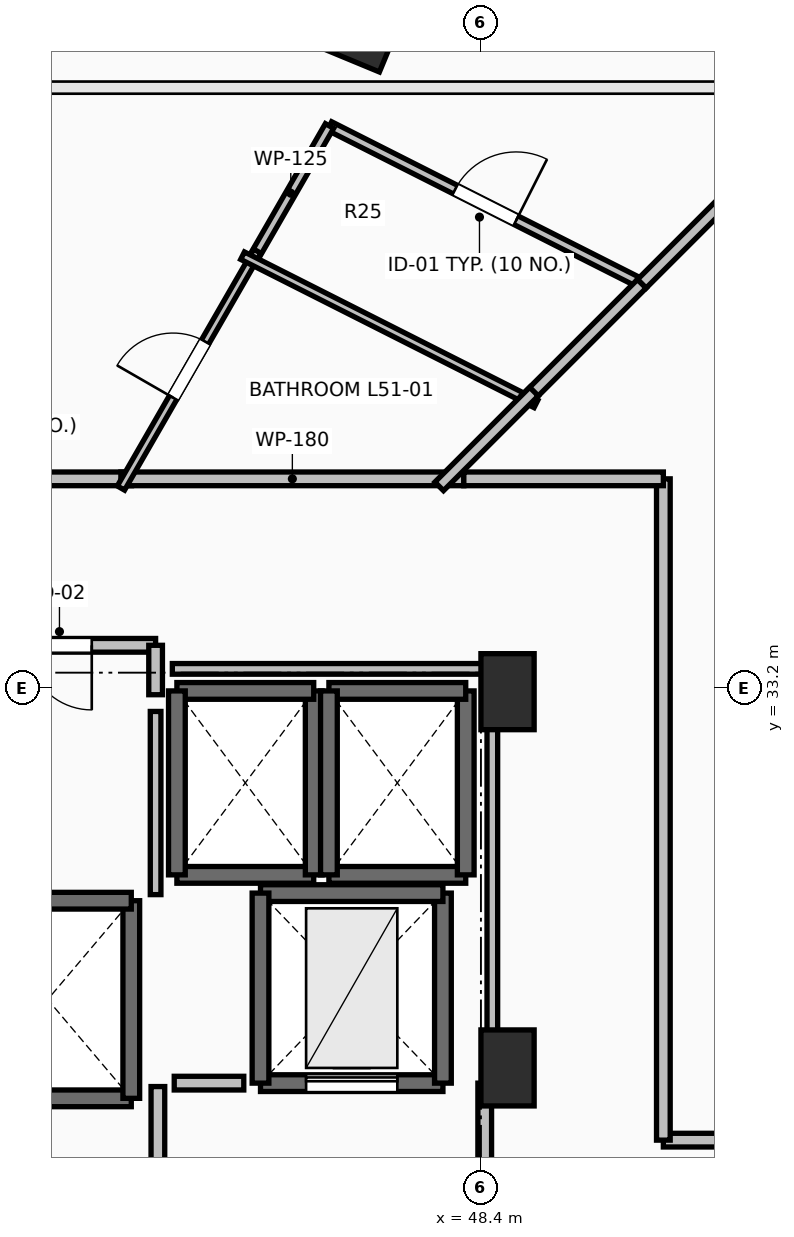
"""IFC4 building model, lengths in metres.
Left out: names, types, materials, properties, quantities, classifications, styles, units other than length and angle.
Written with IfcOpenShell. Run it as: python <this file> out.ifc"""

import sys

from ifc_helpers import new_model, si_unit, direction, frame, frame_2d, origin, origin_2d, place, context, subcontext, project, spatial, rectangle, extrude, element, fill, save


model = new_model("IFC4")
c1 = context("Model", 3, precision=1e-05, world=origin(), true_north=direction((0.0, 1.0)))
c2 = subcontext(c1, "Body", "Model", "MODEL_VIEW")
j1 = project(units=[si_unit("LENGTHUNIT", "METRE"), si_unit("PLANEANGLEUNIT", "RADIAN")], contexts=[c1])
p1 = place(None, origin())
s1 = spatial("IfcSite", under=j1, at=p1, CompositionType="ELEMENT")
p2 = place(p1, origin())
s2 = spatial("IfcBuilding", under=s1, at=p2, CompositionType="ELEMENT")
p3 = place(p2, frame((0.0, 0.0, 189.6)))
s3 = spatial("IfcBuildingStorey", under=s2, at=p3, CompositionType="ELEMENT", Elevation=189.6)
p4 = place(p3, frame((46.821, 41.891, 0.0), z_axis=(0.0, 0.0, 1.0), x_axis=(0.382683432365, 0.923879532511, 0.0)))
e1 = element("IfcColumn", 1, at=p4, inside=s3, PredefinedType="COLUMN", context=c2, shape_type="SweptSolid", body=[
    extrude(rectangle(XDim=0.9, YDim=0.9, at=origin_2d()), origin(), (0.0, 0.0, 1.0), 3.5),
])
for number, where, z_axis, x_axis in (
    (2, (48.75, 33.15, 0.0), (0.0, 0.0, 1.0), (1.0, 0.0, 0.0)),
    (3, (48.75, 28.2, 0.0), (0.0, 0.0, 1.0), (1.0, 0.0, 0.0)),
):
    element("IfcColumn", number, at=place(p3, frame(where, z_axis=z_axis, x_axis=x_axis)), inside=s3, PredefinedType="PILASTER", context=c2, shape_type="SweptSolid", body=[
        extrude(rectangle(XDim=0.7, YDim=1.0, at=origin_2d()), origin(), (0.0, 0.0, 1.0), 3.5),
    ])
p5 = place(p3, frame((41.6, 27.8, 0.0), z_axis=(0.0, 0.0, 1.0), x_axis=(1.0, 0.0, 0.0)))
e4 = element("IfcWall", 4, at=p5, inside=s3, PredefinedType="SOLIDWALL", context=c2, shape_type="SweptSolid", body=[
    extrude(rectangle(XDim=2.2, YDim=0.22, at=frame_2d((1.1, 0.0))), origin(), (0.0, 0.0, 1.0), 3.24),
])
p6 = place(p3, frame((43.8, 27.8, 0.0), z_axis=(0.0, 0.0, 1.0), x_axis=(0.0, 1.0, 0.0)))
e5 = element("IfcWall", 5, at=p6, inside=s3, PredefinedType="SOLIDWALL", context=c2, shape_type="SweptSolid", body=[
    extrude(rectangle(XDim=2.6, YDim=0.22, at=frame_2d((1.3, 0.0))), origin(), (0.0, 0.0, 1.0), 3.24),
])
p7 = place(p3, frame((43.8, 30.4, 0.0), z_axis=(0.0, 0.0, 1.0), x_axis=(-1.0, 0.0, 0.0)))
e6 = element("IfcWall", 6, at=p7, inside=s3, PredefinedType="SOLIDWALL", context=c2, shape_type="SweptSolid", body=[
    extrude(rectangle(XDim=2.2, YDim=0.22, at=frame_2d((1.1, 0.0))), origin(), (0.0, 0.0, 1.0), 3.24),
])
p8 = place(p3, frame((44.4, 30.74, 0.0), z_axis=(0.0, 0.0, 1.0), x_axis=(1.0, 0.0, 0.0)))
e7 = element("IfcWall", 7, at=p8, inside=s3, PredefinedType="SOLIDWALL", context=c2, shape_type="SweptSolid", body=[
    extrude(rectangle(XDim=1.8, YDim=0.22, at=frame_2d((0.9, 0.0))), origin(), (0.0, 0.0, 1.0), 3.24),
])
p9 = place(p3, frame((46.2, 30.74, 0.0), z_axis=(0.0, 0.0, 1.0), x_axis=(0.0, 1.0, 0.0)))
e8 = element("IfcWall", 8, at=p9, inside=s3, PredefinedType="SOLIDWALL", context=c2, shape_type="SweptSolid", body=[
    extrude(rectangle(XDim=2.42, YDim=0.22, at=frame_2d((1.21, 0.0))), origin(), (0.0, 0.0, 1.0), 3.24),
])
p10 = place(p3, frame((46.2, 33.16, 0.0), z_axis=(0.0, 0.0, 1.0), x_axis=(-1.0, 0.0, 0.0)))
e9 = element("IfcWall", 9, at=p10, inside=s3, PredefinedType="SOLIDWALL", context=c2, shape_type="SweptSolid", body=[
    extrude(rectangle(XDim=1.8, YDim=0.22, at=frame_2d((0.9, 0.0))), origin(), (0.0, 0.0, 1.0), 3.24),
])
p11 = place(p3, frame((44.4, 33.16, 0.0), z_axis=(0.0, 0.0, 1.0), x_axis=(0.0, -1.0, 0.0)))
e10 = element("IfcWall", 10, at=p11, inside=s3, PredefinedType="SOLIDWALL", context=c2, shape_type="SweptSolid", body=[
    extrude(rectangle(XDim=2.42, YDim=0.22, at=frame_2d((1.21, 0.0))), origin(), (0.0, 0.0, 1.0), 3.24),
])
p12 = place(p3, frame((46.4, 30.74, 0.0), z_axis=(0.0, 0.0, 1.0), x_axis=(1.0, 0.0, 0.0)))
e11 = element("IfcWall", 11, at=p12, inside=s3, PredefinedType="SOLIDWALL", context=c2, shape_type="SweptSolid", body=[
    extrude(rectangle(XDim=1.8, YDim=0.22, at=frame_2d((0.9, 0.0))), origin(), (0.0, 0.0, 1.0), 3.24),
])
p13 = place(p3, frame((48.2, 30.74, 0.0), z_axis=(0.0, 0.0, 1.0), x_axis=(0.0, 1.0, 0.0)))
e12 = element("IfcWall", 12, at=p13, inside=s3, PredefinedType="SOLIDWALL", context=c2, shape_type="SweptSolid", body=[
    extrude(rectangle(XDim=2.42, YDim=0.22, at=frame_2d((1.21, 0.0))), origin(), (0.0, 0.0, 1.0), 3.24),
])
p14 = place(p3, frame((48.2, 33.16, 0.0), z_axis=(0.0, 0.0, 1.0), x_axis=(-1.0, 0.0, 0.0)))
e13 = element("IfcWall", 13, at=p14, inside=s3, PredefinedType="SOLIDWALL", context=c2, shape_type="SweptSolid", body=[
    extrude(rectangle(XDim=1.8, YDim=0.22, at=frame_2d((0.9, 0.0))), origin(), (0.0, 0.0, 1.0), 3.24),
])
p15 = place(p3, frame((46.4, 33.16, 0.0), z_axis=(0.0, 0.0, 1.0), x_axis=(0.0, -1.0, 0.0)))
e14 = element("IfcWall", 14, at=p15, inside=s3, PredefinedType="SOLIDWALL", context=c2, shape_type="SweptSolid", body=[
    extrude(rectangle(XDim=2.42, YDim=0.22, at=frame_2d((1.21, 0.0))), origin(), (0.0, 0.0, 1.0), 3.24),
])
p16 = place(p3, frame((45.5, 28.0, 0.0), z_axis=(0.0, 0.0, 1.0), x_axis=(1.0, 0.0, 0.0)))
e15 = element("IfcWall", 15, at=p16, inside=s3, PredefinedType="SHEAR", context=c2, shape_type="SweptSolid", body=[
    extrude(rectangle(XDim=2.4, YDim=0.22, at=frame_2d((1.2, 0.0))), origin(), (0.0, 0.0, 1.0), 3.24),
])
p17 = place(p16, frame((0.6, 0.0, 0.0)))
e16 = element("IfcOpeningElement", 16, at=p17, cuts=e15, PredefinedType="OPENING", context=c2, shape_type="SweptSolid", body=[
    extrude(rectangle(XDim=1.2, YDim=2.2, at=frame_2d((0.6, 1.1))), frame((0.0, 0.125, 0.0), z_axis=(0.0, -1.0, 0.0), x_axis=(1.0, 0.0, 0.0)), (0.0, 0.0, 1.0), 0.25),
])
p18 = place(p3, frame((47.9, 28.0, 0.0), z_axis=(0.0, 0.0, 1.0), x_axis=(0.0, 1.0, 0.0)))
e17 = element("IfcWall", 17, at=p18, inside=s3, PredefinedType="SHEAR", context=c2, shape_type="SweptSolid", body=[
    extrude(rectangle(XDim=2.5, YDim=0.22, at=frame_2d((1.25, 0.0))), origin(), (0.0, 0.0, 1.0), 3.24),
])
p19 = place(p3, frame((47.9, 30.5, 0.0), z_axis=(0.0, 0.0, 1.0), x_axis=(-1.0, 0.0, 0.0)))
e18 = element("IfcWall", 18, at=p19, inside=s3, PredefinedType="SHEAR", context=c2, shape_type="SweptSolid", body=[
    extrude(rectangle(XDim=2.4, YDim=0.22, at=frame_2d((1.2, 0.0))), origin(), (0.0, 0.0, 1.0), 3.24),
])
p20 = place(p3, frame((45.5, 30.5, 0.0), z_axis=(0.0, 0.0, 1.0), x_axis=(0.0, -1.0, 0.0)))
e19 = element("IfcWall", 19, at=p20, inside=s3, PredefinedType="SHEAR", context=c2, shape_type="SweptSolid", body=[
    extrude(rectangle(XDim=2.5, YDim=0.22, at=frame_2d((1.25, 0.0))), origin(), (0.0, 0.0, 1.0), 3.24),
])
p21 = place(p3, frame((44.15, 27.955, 0.0), z_axis=(0.0, 0.0, 1.0), x_axis=(0.0, -1.0, 0.0)))
e20 = element("IfcWall", 20, at=p21, inside=s3, PredefinedType="PARTITIONING", context=c2, shape_type="SweptSolid", body=[
    extrude(rectangle(XDim=3.91, YDim=0.18, at=frame_2d((1.955, 0.0))), origin(), (0.0, 0.0, 1.0), 3.24),
])
p22 = place(p21, frame((1.355, 0.0, 0.0)))
e21 = element("IfcOpeningElement", 21, at=p22, cuts=e20, PredefinedType="OPENING", context=c2, shape_type="SweptSolid", body=[
    extrude(rectangle(XDim=1.2, YDim=2.15, at=frame_2d((0.6, 1.075))), frame((0.0, 0.105, 0.0), z_axis=(0.0, -1.0, 0.0), x_axis=(1.0, 0.0, 0.0)), (0.0, 0.0, 1.0), 0.21),
])
p23 = place(p3, frame((48.45, 23.95, 0.0), z_axis=(0.0, 0.0, 1.0), x_axis=(0.0, 1.0, 0.0)))
e22 = element("IfcWall", 22, at=p23, inside=s3, PredefinedType="PARTITIONING", context=c2, shape_type="SweptSolid", body=[
    extrude(rectangle(XDim=4.05, YDim=0.18, at=frame_2d((2.025, 0.0))), origin(), (0.0, 0.0, 1.0), 3.24),
])
p24 = place(p23, frame((1.425, 0.0, 0.0)))
e23 = element("IfcOpeningElement", 23, at=p24, cuts=e22, PredefinedType="OPENING", context=c2, shape_type="SweptSolid", body=[
    extrude(rectangle(XDim=1.2, YDim=2.15, at=frame_2d((0.6, 1.075))), frame((0.0, 0.105, 0.0), z_axis=(0.0, -1.0, 0.0), x_axis=(1.0, 0.0, 0.0)), (0.0, 0.0, 1.0), 0.21),
])
p25 = place(p3, frame((44.12, 33.76, 0.0), z_axis=(0.0, 0.0, 1.0), x_axis=(-1.0, 0.0, 0.0)))
e24 = element("IfcWall", 24, at=p25, inside=s3, PredefinedType="PARTITIONING", context=c2, shape_type="SweptSolid", body=[
    extrude(rectangle(XDim=2.53, YDim=0.18, at=frame_2d((1.265, 0.0))), origin(), (0.0, 0.0, 1.0), 3.24),
])
p26 = place(p25, frame((0.84, 0.0, 0.0)))
e25 = element("IfcOpeningElement", 25, at=p26, cuts=e24, PredefinedType="OPENING", context=c2, shape_type="SweptSolid", body=[
    extrude(rectangle(XDim=0.85, YDim=2.1, at=frame_2d((0.425, 1.05))), frame((0.0, 0.105, 0.0), z_axis=(0.0, -1.0, 0.0), x_axis=(1.0, 0.0, 0.0)), (0.0, 0.0, 1.0), 0.21),
])
p27 = place(p3, frame((44.12, 33.11, 0.0), z_axis=(0.0, 0.0, 1.0), x_axis=(0.0, 1.0, 0.0)))
e26 = element("IfcWall", 26, at=p27, inside=s3, PredefinedType="PARTITIONING", context=c2, shape_type="SweptSolid", body=[
    extrude(rectangle(XDim=0.65, YDim=0.18, at=frame_2d((0.325, 0.0))), origin(), (0.0, 0.0, 1.0), 3.24),
])
p28 = place(p3, frame((43.803, 35.95, 0.0), z_axis=(0.0, 0.0, 1.0), x_axis=(-1.0, 0.0, 0.0)))
e27 = element("IfcWall", 27, at=p28, inside=s3, PredefinedType="PARTITIONING", context=c2, shape_type="SweptSolid", body=[
    extrude(rectangle(XDim=3.965, YDim=0.18, at=frame_2d((1.982, 0.0))), origin(), (0.0, 0.0, 1.0), 3.24),
])
p29 = place(p28, frame((1.482, 0.0, 0.0)))
e28 = element("IfcOpeningElement", 28, at=p29, cuts=e27, PredefinedType="OPENING", context=c2, shape_type="SweptSolid", body=[
    extrude(rectangle(XDim=1.0, YDim=2.15, at=frame_2d((0.5, 1.075))), frame((0.0, 0.105, 0.0), z_axis=(0.0, -1.0, 0.0), x_axis=(1.0, 0.0, 0.0)), (0.0, 0.0, 1.0), 0.21),
])
p30 = place(p3, frame((48.175, 35.95, 0.0), z_axis=(0.0, 0.0, 1.0), x_axis=(-1.0, 0.0, 0.0)))
e29 = element("IfcWall", 29, at=p30, inside=s3, PredefinedType="PARTITIONING", context=c2, shape_type="SweptSolid", body=[
    extrude(rectangle(XDim=4.512, YDim=0.18, at=frame_2d((2.256, 0.0))), origin(), (0.0, 0.0, 1.0), 2.432),
])
p31 = place(p3, frame((59.9, 27.25, 0.0), z_axis=(0.0, 0.0, 1.0), x_axis=(-1.0, 0.0, 0.0)))
e30 = element("IfcWall", 30, at=p31, inside=s3, PredefinedType="PARTITIONING", context=c2, shape_type="SweptSolid", body=[
    extrude(rectangle(XDim=9.1, YDim=0.18, at=frame_2d((4.55, 0.0))), origin(), (0.0, 0.0, 1.0), 2.432),
])
p32 = place(p31, frame((4.05, 0.0, 0.0)))
e31 = element("IfcOpeningElement", 31, at=p32, cuts=e30, PredefinedType="OPENING", context=c2, shape_type="SweptSolid", body=[
    extrude(rectangle(XDim=1.0, YDim=2.15, at=frame_2d((0.5, 1.075))), frame((0.0, 0.105, 0.0), z_axis=(0.0, -1.0, 0.0), x_axis=(1.0, 0.0, 0.0)), (0.0, 0.0, 1.0), 0.21),
])
p33 = place(p3, frame((50.8, 27.25, 0.0), z_axis=(0.0, 0.0, 1.0), x_axis=(0.0, 1.0, 0.0)))
e32 = element("IfcWall", 32, at=p33, inside=s3, PredefinedType="PARTITIONING", context=c2, shape_type="SweptSolid", body=[
    extrude(rectangle(XDim=8.7, YDim=0.18, at=frame_2d((4.35, 0.0))), origin(), (0.0, 0.0, 1.0), 2.432),
])
p34 = place(p3, frame((50.8, 35.95, 0.0), z_axis=(0.0, 0.0, 1.0), x_axis=(-1.0, 0.0, 0.0)))
e33 = element("IfcWall", 33, at=p34, inside=s3, PredefinedType="PARTITIONING", context=c2, shape_type="SweptSolid", body=[
    extrude(rectangle(XDim=2.625, YDim=0.18, at=frame_2d((1.312, 0.0))), origin(), (0.0, 0.0, 1.0), 2.432),
])
p35 = place(p3, frame((46.408, 40.592, 0.0), z_axis=(0.0, 0.0, 1.0), x_axis=(0.89252026196, -0.451007297049, 0.0)))
e34 = element("IfcWall", 34, at=p35, inside=s3, PredefinedType="PARTITIONING", context=c2, shape_type="SweptSolid", body=[
    extrude(rectangle(XDim=4.603, YDim=0.125, at=frame_2d((2.301, 0.0))), origin(), (0.0, 0.0, 1.0), 2.432),
])
p36 = place(p35, frame((1.851, 0.0, 0.0)))
e35 = element("IfcOpeningElement", 35, at=p36, cuts=e34, PredefinedType="OPENING", context=c2, shape_type="SweptSolid", body=[
    extrude(rectangle(XDim=0.9, YDim=2.1, at=frame_2d((0.45, 1.05))), frame((0.0, 0.077, 0.0), z_axis=(0.0, -1.0, 0.0), x_axis=(1.0, 0.0, 0.0)), (0.0, 0.0, 1.0), 0.155),
])
p37 = place(p3, frame((45.389, 38.823, 0.0), z_axis=(0.0, 0.0, 1.0), x_axis=(0.499149502221, 0.866515882389, 0.0)))
e36 = element("IfcWall", 36, at=p37, inside=s3, PredefinedType="PARTITIONING", context=c2, shape_type="SweptSolid", body=[
    extrude(rectangle(XDim=2.042, YDim=0.125, at=frame_2d((1.021, 0.0))), origin(), (0.0, 0.0, 1.0), 2.922),
])
p38 = place(p3, frame((43.664, 35.829, 0.0), z_axis=(0.0, 0.0, 1.0), x_axis=(0.49917767271, 0.866499654396, 0.0)))
e37 = element("IfcWall", 37, at=p38, inside=s3, PredefinedType="PARTITIONING", context=c2, shape_type="SweptSolid", body=[
    extrude(rectangle(XDim=3.596, YDim=0.11, at=frame_2d((1.798, 0.0))), origin(), (0.0, 0.0, 1.0), 2.972),
])
p39 = place(p38, frame((1.373, 0.0, 0.0)))
e38 = element("IfcOpeningElement", 38, at=p39, cuts=e37, PredefinedType="OPENING", context=c2, shape_type="SweptSolid", body=[
    extrude(rectangle(XDim=0.85, YDim=2.1, at=frame_2d((0.425, 1.05))), frame((0.0, 0.07, 0.0), z_axis=(0.0, -1.0, 0.0), x_axis=(1.0, 0.0, 0.0)), (0.0, 0.0, 1.0), 0.14),
])
p40 = place(p3, frame((50.516, 38.516, 0.0), z_axis=(0.0, 0.0, 1.0), x_axis=(0.707106781187, 0.707106781187, 0.0)))
e39 = element("IfcWall", 39, at=p40, inside=s3, PredefinedType="PARTITIONING", context=c2, shape_type="SweptSolid", body=[
    extrude(rectangle(XDim=6.283, YDim=0.16, at=frame_2d((3.142, 0.0))), origin(), (0.0, 0.0, 1.0), 2.774),
])
p41 = place(p3, frame((45.264, 38.886, 0.0), z_axis=(0.0, 0.0, 1.0), x_axis=(0.892556527512, -0.450935522216, 0.0)))
e40 = element("IfcWall", 40, at=p41, inside=s3, PredefinedType="PARTITIONING", context=c2, shape_type="SweptSolid", body=[
    extrude(rectangle(XDim=4.325, YDim=0.11, at=frame_2d((2.162, 0.0))), origin(), (0.0, 0.0, 1.0), 2.432),
])
p42 = place(p3, frame((48.999, 36.999, 0.0), z_axis=(0.0, 0.0, 1.0), x_axis=(0.707106781187, 0.707106781187, 0.0)))
e41 = element("IfcWall", 41, at=p42, inside=s3, PredefinedType="PARTITIONING", context=c2, shape_type="SweptSolid", body=[
    extrude(rectangle(XDim=2.146, YDim=0.16, at=frame_2d((1.073, 0.0))), origin(), (0.0, 0.0, 1.0), 2.922),
])
p43 = place(p3, frame((47.851, 35.851, 0.0), z_axis=(0.0, 0.0, 1.0), x_axis=(0.707106781187, 0.707106781187, 0.0)))
e42 = element("IfcWall", 42, at=p43, inside=s3, PredefinedType="PARTITIONING", context=c2, shape_type="SweptSolid", body=[
    extrude(rectangle(XDim=1.763, YDim=0.16, at=frame_2d((0.882, 0.0))), origin(), (0.0, 0.0, 1.0), 2.432),
])
p44 = place(p3, frame((45.28, 28.0, 0.0), z_axis=(0.0, 0.0, 1.0), x_axis=(-1.0, 0.0, 0.0)))
e43 = element("IfcWall", 43, at=p44, inside=s3, PredefinedType="PARTITIONING", context=c2, shape_type="SweptSolid", body=[
    extrude(rectangle(XDim=0.915, YDim=0.18, at=frame_2d((0.458, 0.0))), origin(), (0.0, 0.0, 1.0), 3.24),
])
p45 = place(p3, frame((44.12, 30.48, 0.0), z_axis=(0.0, 0.0, 1.0), x_axis=(0.0, 1.0, 0.0)))
e44 = element("IfcWall", 44, at=p45, inside=s3, PredefinedType="PARTITIONING", context=c2, shape_type="SweptSolid", body=[
    extrude(rectangle(XDim=2.41, YDim=0.14, at=frame_2d((1.205, 0.0))), origin(), (0.0, 0.0, 1.0), 3.24),
])
p46 = place(p3, frame((48.55, 28.196, 0.0), z_axis=(0.0, 0.0, 1.0), x_axis=(0.0, 1.0, 0.0)))
e45 = element("IfcWall", 45, at=p46, inside=s3, PredefinedType="PARTITIONING", context=c2, shape_type="SweptSolid", body=[
    extrude(rectangle(XDim=5.254, YDim=0.14, at=frame_2d((2.627, 0.0))), origin(), (0.0, 0.0, 1.0), 2.432),
])
p47 = place(p3, frame((48.55, 33.45, 0.0), z_axis=(0.0, 0.0, 1.0), x_axis=(-1.0, 0.0, 0.0)))
e46 = element("IfcWall", 46, at=p47, inside=s3, PredefinedType="PARTITIONING", context=c2, shape_type="SweptSolid", body=[
    extrude(rectangle(XDim=4.21, YDim=0.14, at=frame_2d((2.105, 0.0))), origin(), (0.0, 0.0, 1.0), 2.432),
])
p48 = place(p17, origin())
e47 = element("IfcDoor", 47, at=p48, inside=s3, OperationType="SLIDING_TO_LEFT", PredefinedType="DOOR", context=c2, shape_type="SweptSolid", body=[
    extrude(rectangle(XDim=1.2, YDim=2.2, at=frame_2d((0.6, 1.1))), frame((0.0, 0.025, 0.0), z_axis=(0.0, -1.0, 0.0), x_axis=(1.0, 0.0, 0.0)), (0.0, 0.0, 1.0), 0.05),
])
fill(e16, e47)
p49 = place(p26, origin())
e48 = element("IfcDoor", 48, at=p49, inside=s3, OperationType="SINGLE_SWING_LEFT", PredefinedType="DOOR", context=c2, shape_type="SweptSolid", body=[
    extrude(rectangle(XDim=0.85, YDim=2.1, at=frame_2d((0.425, 1.05))), frame((0.0, 0.025, 0.0), z_axis=(0.0, -1.0, 0.0), x_axis=(1.0, 0.0, 0.0)), (0.0, 0.0, 1.0), 0.05),
])
fill(e25, e48)
p50 = place(p36, origin())
e49 = element("IfcDoor", 49, at=p50, inside=s3, OperationType="SINGLE_SWING_RIGHT", PredefinedType="DOOR", context=c2, shape_type="SweptSolid", body=[
    extrude(rectangle(XDim=0.9, YDim=2.1, at=frame_2d((0.45, 1.05))), frame((0.0, 0.025, 0.0), z_axis=(0.0, -1.0, 0.0), x_axis=(1.0, 0.0, 0.0)), (0.0, 0.0, 1.0), 0.05),
])
fill(e35, e49)
p51 = place(p39, origin())
e50 = element("IfcDoor", 50, at=p51, inside=s3, OperationType="SINGLE_SWING_LEFT", PredefinedType="DOOR", context=c2, shape_type="SweptSolid", body=[
    extrude(rectangle(XDim=0.85, YDim=2.1, at=frame_2d((0.425, 1.05))), frame((0.0, 0.025, 0.0), z_axis=(0.0, -1.0, 0.0), x_axis=(1.0, 0.0, 0.0)), (0.0, 0.0, 1.0), 0.05),
])
fill(e38, e50)
save(model, sys.argv[1])
